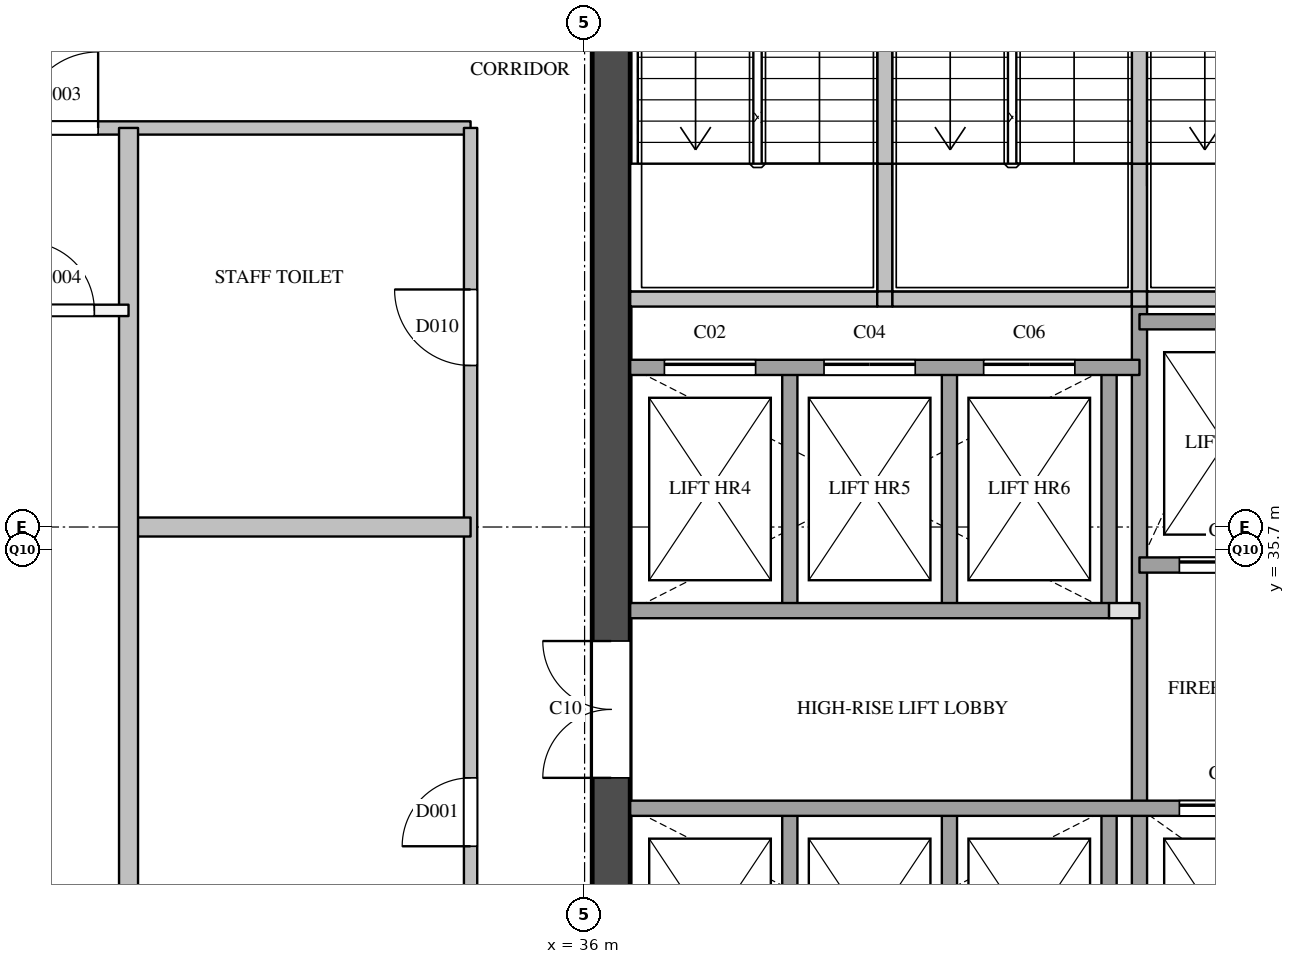
"""IFC4 building model, lengths in metres.
Left out: names, types, materials, properties, quantities, classifications, styles, units other than length and angle.
Written with IfcOpenShell. Run it as: python <this file> out.ifc"""

import sys

from ifc_helpers import new_model, si_unit, direction, frame, frame_2d, origin, place, context, subcontext, project, spatial, rectangle, extrude, element, fill, save


model = new_model("IFC4")
c1 = context("Model", 3, precision=1e-05, world=origin(), true_north=direction((0.0, 1.0)))
c2 = subcontext(c1, "Body", "Model", "MODEL_VIEW")
j1 = project(units=[si_unit("LENGTHUNIT", "METRE"), si_unit("PLANEANGLEUNIT", "RADIAN")], contexts=[c1])
p1 = place(None, origin())
s1 = spatial("IfcSite", under=j1, at=p1, CompositionType="ELEMENT")
p2 = place(p1, origin())
s2 = spatial("IfcBuilding", under=s1, at=p2, CompositionType="ELEMENT")
p3 = place(p2, frame((0.0, 0.0, 158.3)))
s3 = spatial("IfcBuildingStorey", under=s2, at=p3, CompositionType="ELEMENT", Elevation=158.3)
p4 = place(p3, frame((36.35, 29.1, 0.0), z_axis=(0.0, 0.0, 1.0), x_axis=(0.0, 1.0, 0.0)))
e1 = element("IfcWall", 1, at=p4, inside=s3, PredefinedType="SHEAR", context=c2, shape_type="SweptSolid", body=[
    extrude(rectangle(XDim=20.3, YDim=0.5, at=frame_2d((10.15, 0.0))), origin(), (0.0, 0.0, 1.0), 3.6),
])
p5 = place(p4, frame((3.6, 0.0, 0.0)))
e2 = element("IfcOpeningElement", 2, at=p5, cuts=e1, PredefinedType="OPENING", context=c2, shape_type="SweptSolid", body=[
    extrude(rectangle(XDim=1.8, YDim=2.1, at=frame_2d((0.9, 1.05))), frame((0.0, 0.26, 0.0), z_axis=(0.0, -1.0, 0.0), x_axis=(1.0, 0.0, 0.0)), (0.0, 0.0, 1.0), 0.52),
])
p6 = place(p4, frame((16.4, 0.0, 0.0)))
e3 = element("IfcOpeningElement", 3, at=p6, cuts=e1, PredefinedType="OPENING", context=c2, shape_type="SweptSolid", body=[
    extrude(rectangle(XDim=1.0, YDim=2.1, at=frame_2d((0.5, 1.05))), frame((0.0, 0.26, 0.0), z_axis=(0.0, -1.0, 0.0), x_axis=(1.0, 0.0, 0.0)), (0.0, 0.0, 1.0), 0.52),
])
p7 = place(p3, frame((38.7, 29.1, 0.0), z_axis=(0.0, 0.0, 1.0), x_axis=(0.0, 1.0, 0.0)))
e4 = element("IfcWall", 4, at=p7, inside=s3, PredefinedType="SOLIDWALL", context=c2, shape_type="SweptSolid", body=[
    extrude(rectangle(XDim=3.2, YDim=0.2, at=frame_2d((1.6, 0.0))), origin(), (0.0, 0.0, 1.0), 3.6),
])
p8 = place(p3, frame((38.7, 34.9, 0.0), z_axis=(0.0, 0.0, 1.0), x_axis=(0.0, 1.0, 0.0)))
e5 = element("IfcWall", 5, at=p8, inside=s3, PredefinedType="SOLIDWALL", context=c2, shape_type="SweptSolid", body=[
    extrude(rectangle(XDim=3.2, YDim=0.2, at=frame_2d((1.6, 0.0))), origin(), (0.0, 0.0, 1.0), 3.6),
])
p9 = place(p3, frame((39.95, 39.0, 0.0), z_axis=(0.0, 0.0, 1.0), x_axis=(0.0, 1.0, 0.0)))
e6 = element("IfcWall", 6, at=p9, inside=s3, PredefinedType="SOLIDWALL", context=c2, shape_type="SweptSolid", body=[
    extrude(rectangle(XDim=1.78, YDim=0.2, at=frame_2d((0.89, 0.0))), origin(), (0.0, 0.0, 1.0), 3.6),
])
p10 = place(p3, frame((39.95, 40.78, 0.0), z_axis=(0.0, 0.0, 1.0), x_axis=(0.0, 1.0, 0.0)))
e7 = element("IfcWall", 7, at=p10, inside=s3, PredefinedType="SOLIDWALL", context=c2, shape_type="SweptSolid", body=[
    extrude(rectangle(XDim=4.42, YDim=0.2, at=frame_2d((2.21, 0.0))), origin(), (0.0, 0.0, 1.0), 3.6),
])
p11 = place(p3, frame((40.8, 29.1, 0.0), z_axis=(0.0, 0.0, 1.0), x_axis=(0.0, 1.0, 0.0)))
e8 = element("IfcWall", 8, at=p11, inside=s3, PredefinedType="SOLIDWALL", context=c2, shape_type="SweptSolid", body=[
    extrude(rectangle(XDim=3.2, YDim=0.2, at=frame_2d((1.6, 0.0))), origin(), (0.0, 0.0, 1.0), 3.6),
])
p12 = place(p3, frame((40.8, 34.9, 0.0), z_axis=(0.0, 0.0, 1.0), x_axis=(0.0, 1.0, 0.0)))
e9 = element("IfcWall", 9, at=p12, inside=s3, PredefinedType="SOLIDWALL", context=c2, shape_type="SweptSolid", body=[
    extrude(rectangle(XDim=3.2, YDim=0.2, at=frame_2d((1.6, 0.0))), origin(), (0.0, 0.0, 1.0), 3.6),
])
p13 = place(p3, frame((42.9, 29.1, 0.0), z_axis=(0.0, 0.0, 1.0), x_axis=(0.0, 1.0, 0.0)))
e10 = element("IfcWall", 10, at=p13, inside=s3, PredefinedType="SOLIDWALL", context=c2, shape_type="SweptSolid", body=[
    extrude(rectangle(XDim=3.2, YDim=0.2, at=frame_2d((1.6, 0.0))), origin(), (0.0, 0.0, 1.0), 3.6),
])
p14 = place(p3, frame((42.9, 34.9, 0.0), z_axis=(0.0, 0.0, 1.0), x_axis=(0.0, 1.0, 0.0)))
e11 = element("IfcWall", 11, at=p14, inside=s3, PredefinedType="SOLIDWALL", context=c2, shape_type="SweptSolid", body=[
    extrude(rectangle(XDim=3.2, YDim=0.2, at=frame_2d((1.6, 0.0))), origin(), (0.0, 0.0, 1.0), 3.6),
])
p15 = place(p3, frame((43.3, 29.1, 0.0), z_axis=(0.0, 0.0, 1.0), x_axis=(0.0, 1.0, 0.0)))
e12 = element("IfcWall", 12, at=p15, inside=s3, PredefinedType="SOLIDWALL", context=c2, shape_type="SweptSolid", body=[
    extrude(rectangle(XDim=9.9, YDim=0.2, at=frame_2d((4.95, 0.0))), origin(), (0.0, 0.0, 1.0), 3.6),
])
p16 = place(p3, frame((43.3, 39.0, 0.0), z_axis=(0.0, 0.0, 1.0), x_axis=(0.0, 1.0, 0.0)))
e13 = element("IfcWall", 13, at=p16, inside=s3, PredefinedType="SOLIDWALL", context=c2, shape_type="SweptSolid", body=[
    extrude(rectangle(XDim=1.78, YDim=0.2, at=frame_2d((0.89, 0.0))), origin(), (0.0, 0.0, 1.0), 3.6),
])
p17 = place(p3, frame((43.3, 40.78, 0.0), z_axis=(0.0, 0.0, 1.0), x_axis=(0.0, 1.0, 0.0)))
e14 = element("IfcWall", 14, at=p17, inside=s3, PredefinedType="SOLIDWALL", context=c2, shape_type="SweptSolid", body=[
    extrude(rectangle(XDim=4.42, YDim=0.2, at=frame_2d((2.21, 0.0))), origin(), (0.0, 0.0, 1.0), 3.6),
])
p18 = place(p3, frame((36.6, 32.3, 0.0), z_axis=(0.0, 0.0, 1.0), x_axis=(1.0, 0.0, 0.0)))
e15 = element("IfcWall", 15, at=p18, inside=s3, PredefinedType="SOLIDWALL", context=c2, shape_type="SweptSolid", body=[
    extrude(rectangle(XDim=11.2, YDim=0.2, at=frame_2d((5.6, 0.0))), origin(), (0.0, 0.0, 1.0), 3.6),
])
p19 = place(p18, frame((7.225, 0.0, 0.0)))
e16 = element("IfcOpeningElement", 16, at=p19, cuts=e15, PredefinedType="OPENING", context=c2, shape_type="SweptSolid", body=[
    extrude(rectangle(XDim=1.2, YDim=2.1, at=frame_2d((0.6, 1.05))), frame((0.0, 0.11, 0.0), z_axis=(0.0, -1.0, 0.0), x_axis=(1.0, 0.0, 0.0)), (0.0, 0.0, 1.0), 0.22),
])
p20 = place(p18, frame((9.475, 0.0, 0.0)))
e17 = element("IfcOpeningElement", 17, at=p20, cuts=e15, PredefinedType="OPENING", context=c2, shape_type="SweptSolid", body=[
    extrude(rectangle(XDim=1.2, YDim=2.1, at=frame_2d((0.6, 1.05))), frame((0.0, 0.11, 0.0), z_axis=(0.0, -1.0, 0.0), x_axis=(1.0, 0.0, 0.0)), (0.0, 0.0, 1.0), 0.22),
])
p21 = place(p3, frame((42.9, 34.9, 0.0), z_axis=(0.0, 0.0, 1.0), x_axis=(1.0, 0.0, 0.0)))
e18 = element("IfcWall", 18, at=p21, inside=s3, PredefinedType="PARTITIONING", context=c2, shape_type="SweptSolid", body=[
    extrude(rectangle(XDim=0.4, YDim=0.2, at=frame_2d((0.2, 0.0))), origin(), (0.0, 0.0, 1.0), 3.6),
])
p22 = place(p3, frame((36.6, 34.9, 0.0), z_axis=(0.0, 0.0, 1.0), x_axis=(1.0, 0.0, 0.0)))
e19 = element("IfcWall", 19, at=p22, inside=s3, PredefinedType="SOLIDWALL", context=c2, shape_type="SweptSolid", body=[
    extrude(rectangle(XDim=6.3, YDim=0.2, at=frame_2d((3.15, 0.0))), origin(), (0.0, 0.0, 1.0), 3.6),
])
p23 = place(p3, frame((43.3, 35.5, 0.0), z_axis=(0.0, 0.0, 1.0), x_axis=(1.0, 0.0, 0.0)))
e20 = element("IfcWall", 20, at=p23, inside=s3, PredefinedType="SOLIDWALL", context=c2, shape_type="SweptSolid", body=[
    extrude(rectangle(XDim=4.5, YDim=0.2, at=frame_2d((2.25, 0.0))), origin(), (0.0, 0.0, 1.0), 3.6),
])
p24 = place(p23, frame((0.525, 0.0, 0.0)))
e21 = element("IfcOpeningElement", 21, at=p24, cuts=e20, PredefinedType="OPENING", context=c2, shape_type="SweptSolid", body=[
    extrude(rectangle(XDim=1.2, YDim=2.1, at=frame_2d((0.6, 1.05))), frame((0.0, 0.11, 0.0), z_axis=(0.0, -1.0, 0.0), x_axis=(1.0, 0.0, 0.0)), (0.0, 0.0, 1.0), 0.22),
])
p25 = place(p23, frame((3.025, 0.0, 0.0)))
e22 = element("IfcOpeningElement", 22, at=p25, cuts=e20, PredefinedType="OPENING", context=c2, shape_type="SweptSolid", body=[
    extrude(rectangle(XDim=0.7, YDim=2.1, at=frame_2d((0.35, 1.05))), frame((0.0, 0.11, 0.0), z_axis=(0.0, -1.0, 0.0), x_axis=(1.0, 0.0, 0.0)), (0.0, 0.0, 1.0), 0.22),
])
p26 = place(p3, frame((36.6, 38.1, 0.0), z_axis=(0.0, 0.0, 1.0), x_axis=(1.0, 0.0, 0.0)))
e23 = element("IfcWall", 23, at=p26, inside=s3, PredefinedType="SOLIDWALL", context=c2, shape_type="SweptSolid", body=[
    extrude(rectangle(XDim=6.7, YDim=0.2, at=frame_2d((3.35, 0.0))), origin(), (0.0, 0.0, 1.0), 3.6),
])
p27 = place(p26, frame((0.45, 0.0, 0.0)))
e24 = element("IfcOpeningElement", 24, at=p27, cuts=e23, PredefinedType="OPENING", context=c2, shape_type="SweptSolid", body=[
    extrude(rectangle(XDim=1.2, YDim=2.1, at=frame_2d((0.6, 1.05))), frame((0.0, 0.11, 0.0), z_axis=(0.0, -1.0, 0.0), x_axis=(1.0, 0.0, 0.0)), (0.0, 0.0, 1.0), 0.22),
])
p28 = place(p26, frame((2.55, 0.0, 0.0)))
e25 = element("IfcOpeningElement", 25, at=p28, cuts=e23, PredefinedType="OPENING", context=c2, shape_type="SweptSolid", body=[
    extrude(rectangle(XDim=1.2, YDim=2.1, at=frame_2d((0.6, 1.05))), frame((0.0, 0.11, 0.0), z_axis=(0.0, -1.0, 0.0), x_axis=(1.0, 0.0, 0.0)), (0.0, 0.0, 1.0), 0.22),
])
p29 = place(p26, frame((4.65, 0.0, 0.0)))
e26 = element("IfcOpeningElement", 26, at=p29, cuts=e23, PredefinedType="OPENING", context=c2, shape_type="SweptSolid", body=[
    extrude(rectangle(XDim=1.2, YDim=2.1, at=frame_2d((0.6, 1.05))), frame((0.0, 0.11, 0.0), z_axis=(0.0, -1.0, 0.0), x_axis=(1.0, 0.0, 0.0)), (0.0, 0.0, 1.0), 0.22),
])
p30 = place(p3, frame((43.3, 38.7, 0.0), z_axis=(0.0, 0.0, 1.0), x_axis=(1.0, 0.0, 0.0)))
e27 = element("IfcWall", 27, at=p30, inside=s3, PredefinedType="SOLIDWALL", context=c2, shape_type="SweptSolid", body=[
    extrude(rectangle(XDim=4.5, YDim=0.2, at=frame_2d((2.25, 0.0))), origin(), (0.0, 0.0, 1.0), 3.6),
])
p31 = place(p3, frame((36.6, 39.0, 0.0), z_axis=(0.0, 0.0, 1.0), x_axis=(1.0, 0.0, 0.0)))
e28 = element("IfcWall", 28, at=p31, inside=s3, PredefinedType="SOLIDWALL", context=c2, shape_type="SweptSolid", body=[
    extrude(rectangle(XDim=3.25, YDim=0.2, at=frame_2d((1.625, 0.0))), origin(), (0.0, 0.0, 1.0), 3.6),
])
p32 = place(p3, frame((39.85, 39.0, 0.0), z_axis=(0.0, 0.0, 1.0), x_axis=(1.0, 0.0, 0.0)))
e29 = element("IfcWall", 29, at=p32, inside=s3, PredefinedType="SOLIDWALL", context=c2, shape_type="SweptSolid", body=[
    extrude(rectangle(XDim=0.2, YDim=0.2, at=frame_2d((0.1, 0.0))), origin(), (0.0, 0.0, 1.0), 3.6),
])
p33 = place(p3, frame((40.05, 39.0, 0.0), z_axis=(0.0, 0.0, 1.0), x_axis=(1.0, 0.0, 0.0)))
e30 = element("IfcWall", 30, at=p33, inside=s3, PredefinedType="SOLIDWALL", context=c2, shape_type="SweptSolid", body=[
    extrude(rectangle(XDim=3.15, YDim=0.2, at=frame_2d((1.575, 0.0))), origin(), (0.0, 0.0, 1.0), 3.6),
])
p34 = place(p3, frame((43.2, 39.0, 0.0), z_axis=(0.0, 0.0, 1.0), x_axis=(1.0, 0.0, 0.0)))
e31 = element("IfcWall", 31, at=p34, inside=s3, PredefinedType="SOLIDWALL", context=c2, shape_type="SweptSolid", body=[
    extrude(rectangle(XDim=0.2, YDim=0.2, at=frame_2d((0.1, 0.0))), origin(), (0.0, 0.0, 1.0), 3.6),
])
p35 = place(p3, frame((43.4, 39.0, 0.0), z_axis=(0.0, 0.0, 1.0), x_axis=(1.0, 0.0, 0.0)))
e32 = element("IfcWall", 32, at=p35, inside=s3, PredefinedType="SOLIDWALL", context=c2, shape_type="SweptSolid", body=[
    extrude(rectangle(XDim=3.25, YDim=0.2, at=frame_2d((1.625, 0.0))), origin(), (0.0, 0.0, 1.0), 3.6),
])
p36 = place(p3, frame((19.5, 41.25, 0.0), z_axis=(0.0, 0.0, 1.0), x_axis=(1.0, 0.0, 0.0)))
e33 = element("IfcWall", 33, at=p36, inside=s3, PredefinedType="PARTITIONING", context=c2, shape_type="SweptSolid", body=[
    extrude(rectangle(XDim=15.0, YDim=0.175, at=frame_2d((7.5, 0.0))), origin(), (0.0, 0.0, 1.0), 2.6),
])
p37 = place(p36, frame((9.1, 0.0, 0.0)))
e34 = element("IfcOpeningElement", 34, at=p37, cuts=e33, PredefinedType="OPENING", context=c2, shape_type="SweptSolid", body=[
    extrude(rectangle(XDim=1.0, YDim=2.1, at=frame_2d((0.5, 1.05))), frame((0.0, 0.097, 0.0), z_axis=(0.0, -1.0, 0.0), x_axis=(1.0, 0.0, 0.0)), (0.0, 0.0, 1.0), 0.195),
])
p38 = place(p3, frame((34.5, 28.5, 0.0), z_axis=(0.0, 0.0, 1.0), x_axis=(0.0, 1.0, 0.0)))
e35 = element("IfcWall", 35, at=p38, inside=s3, PredefinedType="PARTITIONING", context=c2, shape_type="SweptSolid", body=[
    extrude(rectangle(XDim=12.75, YDim=0.175, at=frame_2d((6.375, 0.0))), origin(), (0.0, 0.0, 1.0), 3.6),
])
p39 = place(p38, frame((3.3, 0.0, 0.0)))
e36 = element("IfcOpeningElement", 36, at=p39, cuts=e35, PredefinedType="OPENING", context=c2, shape_type="SweptSolid", body=[
    extrude(rectangle(XDim=0.9, YDim=2.1, at=frame_2d((0.45, 1.05))), frame((0.0, 0.097, 0.0), z_axis=(0.0, -1.0, 0.0), x_axis=(1.0, 0.0, 0.0)), (0.0, 0.0, 1.0), 0.195),
])
p40 = place(p38, frame((9.625, 0.0, 0.0)))
e37 = element("IfcOpeningElement", 37, at=p40, cuts=e35, PredefinedType="OPENING", context=c2, shape_type="SweptSolid", body=[
    extrude(rectangle(XDim=1.0, YDim=2.1, at=frame_2d((0.5, 1.05))), frame((0.0, 0.097, 0.0), z_axis=(0.0, -1.0, 0.0), x_axis=(1.0, 0.0, 0.0)), (0.0, 0.0, 1.0), 0.195),
])
p41 = place(p3, frame((28.2, 38.85, 0.0), z_axis=(0.0, 0.0, 1.0), x_axis=(1.0, 0.0, 0.0)))
e38 = element("IfcWall", 38, at=p41, inside=s3, PredefinedType="PARTITIONING", context=c2, shape_type="SweptSolid", body=[
    extrude(rectangle(XDim=1.8, YDim=0.15, at=frame_2d((0.9, 0.0))), origin(), (0.0, 0.0, 1.0), 3.6),
])
p42 = place(p41, frame((0.45, 0.0, 0.0)))
e39 = element("IfcOpeningElement", 39, at=p42, cuts=e38, PredefinedType="OPENING", context=c2, shape_type="SweptSolid", body=[
    extrude(rectangle(XDim=0.9, YDim=2.1, at=frame_2d((0.45, 1.05))), frame((0.0, 0.085, 0.0), z_axis=(0.0, -1.0, 0.0), x_axis=(1.0, 0.0, 0.0)), (0.0, 0.0, 1.0), 0.17),
])
p43 = place(p3, frame((30.0, 36.0, 0.0), z_axis=(0.0, 0.0, 1.0), x_axis=(1.0, 0.0, 0.0)))
e40 = element("IfcWall", 40, at=p43, inside=s3, PredefinedType="PARTITIONING", context=c2, shape_type="SweptSolid", body=[
    extrude(rectangle(XDim=4.5, YDim=0.25, at=frame_2d((2.25, 0.0))), origin(), (0.0, 0.0, 1.0), 3.6),
])
p44 = place(p3, frame((30.0, 27.0, 0.0), z_axis=(0.0, 0.0, 1.0), x_axis=(0.0, 1.0, 0.0)))
e41 = element("IfcWall", 41, at=p44, inside=s3, PredefinedType="PARTITIONING", context=c2, shape_type="SweptSolid", body=[
    extrude(rectangle(XDim=14.25, YDim=0.25, at=frame_2d((7.125, 0.0))), origin(), (0.0, 0.0, 1.0), 2.6),
])
p45 = place(p27, origin())
e42 = element("IfcDoor", 42, at=p45, inside=s3, OperationType="SLIDING_TO_LEFT", PredefinedType="DOOR", context=c2, shape_type="SweptSolid", body=[
    extrude(rectangle(XDim=1.2, YDim=2.1, at=frame_2d((0.6, 1.05))), frame((0.0, 0.025, 0.0), z_axis=(0.0, -1.0, 0.0), x_axis=(1.0, 0.0, 0.0)), (0.0, 0.0, 1.0), 0.05),
])
fill(e24, e42)
p46 = place(p28, origin())
e43 = element("IfcDoor", 43, at=p46, inside=s3, OperationType="SLIDING_TO_LEFT", PredefinedType="DOOR", context=c2, shape_type="SweptSolid", body=[
    extrude(rectangle(XDim=1.2, YDim=2.1, at=frame_2d((0.6, 1.05))), frame((0.0, 0.025, 0.0), z_axis=(0.0, -1.0, 0.0), x_axis=(1.0, 0.0, 0.0)), (0.0, 0.0, 1.0), 0.05),
])
fill(e25, e43)
p47 = place(p29, origin())
e44 = element("IfcDoor", 44, at=p47, inside=s3, OperationType="SLIDING_TO_LEFT", PredefinedType="DOOR", context=c2, shape_type="SweptSolid", body=[
    extrude(rectangle(XDim=1.2, YDim=2.1, at=frame_2d((0.6, 1.05))), frame((0.0, 0.025, 0.0), z_axis=(0.0, -1.0, 0.0), x_axis=(1.0, 0.0, 0.0)), (0.0, 0.0, 1.0), 0.05),
])
fill(e26, e44)
p48 = place(p19, origin())
e45 = element("IfcDoor", 45, at=p48, inside=s3, OperationType="SLIDING_TO_LEFT", PredefinedType="DOOR", context=c2, shape_type="SweptSolid", body=[
    extrude(rectangle(XDim=1.2, YDim=2.1, at=frame_2d((0.6, 1.05))), frame((0.0, 0.025, 0.0), z_axis=(0.0, -1.0, 0.0), x_axis=(1.0, 0.0, 0.0)), (0.0, 0.0, 1.0), 0.05),
])
fill(e16, e45)
p49 = place(p24, origin())
e46 = element("IfcDoor", 46, at=p49, inside=s3, OperationType="SLIDING_TO_LEFT", PredefinedType="DOOR", context=c2, shape_type="SweptSolid", body=[
    extrude(rectangle(XDim=1.2, YDim=2.1, at=frame_2d((0.6, 1.05))), frame((0.0, 0.025, 0.0), z_axis=(0.0, -1.0, 0.0), x_axis=(1.0, 0.0, 0.0)), (0.0, 0.0, 1.0), 0.05),
])
fill(e21, e46)
p50 = place(p5, origin())
e47 = element("IfcDoor", 47, at=p50, inside=s3, OperationType="DOUBLE_DOOR_SINGLE_SWING", PredefinedType="DOOR", context=c2, shape_type="SweptSolid", body=[
    extrude(rectangle(XDim=1.8, YDim=2.1, at=frame_2d((0.9, 1.05))), frame((0.0, 0.025, 0.0), z_axis=(0.0, -1.0, 0.0), x_axis=(1.0, 0.0, 0.0)), (0.0, 0.0, 1.0), 0.05),
])
fill(e2, e47)
p51 = place(p39, origin())
e48 = element("IfcDoor", 48, at=p51, inside=s3, OperationType="SINGLE_SWING_LEFT", PredefinedType="DOOR", context=c2, shape_type="SweptSolid", body=[
    extrude(rectangle(XDim=0.9, YDim=2.1, at=frame_2d((0.45, 1.05))), frame((0.0, 0.025, 0.0), z_axis=(0.0, -1.0, 0.0), x_axis=(1.0, 0.0, 0.0)), (0.0, 0.0, 1.0), 0.05),
])
fill(e36, e48)
p52 = place(p37, origin())
e49 = element("IfcDoor", 49, at=p52, inside=s3, OperationType="SINGLE_SWING_RIGHT", PredefinedType="DOOR", context=c2, shape_type="SweptSolid", body=[
    extrude(rectangle(XDim=1.0, YDim=2.1, at=frame_2d((0.5, 1.05))), frame((0.0, 0.025, 0.0), z_axis=(0.0, -1.0, 0.0), x_axis=(1.0, 0.0, 0.0)), (0.0, 0.0, 1.0), 0.05),
])
fill(e34, e49)
p53 = place(p42, origin())
e50 = element("IfcDoor", 50, at=p53, inside=s3, OperationType="SINGLE_SWING_LEFT", PredefinedType="DOOR", context=c2, shape_type="SweptSolid", body=[
    extrude(rectangle(XDim=0.9, YDim=2.1, at=frame_2d((0.45, 1.05))), frame((0.0, 0.025, 0.0), z_axis=(0.0, -1.0, 0.0), x_axis=(1.0, 0.0, 0.0)), (0.0, 0.0, 1.0), 0.05),
])
fill(e39, e50)
p54 = place(p40, origin())
e51 = element("IfcDoor", 51, at=p54, inside=s3, OperationType="SINGLE_SWING_RIGHT", PredefinedType="DOOR", context=c2, shape_type="SweptSolid", body=[
    extrude(rectangle(XDim=1.0, YDim=2.1, at=frame_2d((0.5, 1.05))), frame((0.0, 0.025, 0.0), z_axis=(0.0, -1.0, 0.0), x_axis=(1.0, 0.0, 0.0)), (0.0, 0.0, 1.0), 0.05),
])
fill(e37, e51)
save(model, sys.argv[1])
